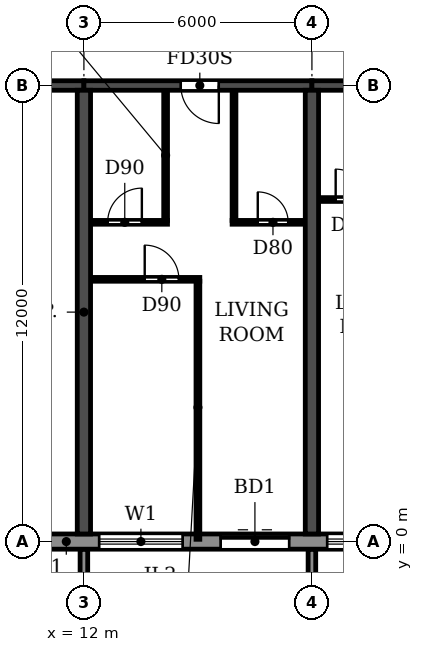
"""IFC4 building model, lengths in metres.
Left out: names, types, materials, properties, quantities, classifications, styles, units other than length and angle.
Written with IfcOpenShell. Run it as: python <this file> out.ifc"""

import sys

from ifc_helpers import new_model, si_unit, direction, frame, frame_2d, origin, place, context, subcontext, project, spatial, polyline, rectangle, outline, extrude, source, transform, mapped, element, fill, save


model = new_model("IFC4")
c1 = context("Model", 3, precision=1e-05, world=origin(), true_north=direction((0.0, 1.0)))
c2 = subcontext(c1, "Body", "Model", "MODEL_VIEW")
j1 = project(units=[si_unit("LENGTHUNIT", "METRE"), si_unit("PLANEANGLEUNIT", "RADIAN")], contexts=[c1])
p1 = place(None, origin())
s1 = spatial("IfcSite", under=j1, at=p1, CompositionType="ELEMENT")
p2 = place(p1, origin())
s2 = spatial("IfcBuilding", under=s1, at=p2, CompositionType="ELEMENT")
p3 = place(p2, frame((0.0, 0.0, 76.2)))
s3 = spatial("IfcBuildingStorey", under=s2, at=p3, CompositionType="ELEMENT", Elevation=76.2)
for number, where, z_axis, x_axis in (
    (1, (12.0, 0.2, 0.0), (0.0, 0.0, 1.0), (0.0, 1.0, 0.0)),
    (2, (18.0, 0.2, 0.0), (0.0, 0.0, 1.0), (0.0, 1.0, 0.0)),
):
    element("IfcWall", number, at=place(p3, frame(where, z_axis=z_axis, x_axis=x_axis)), inside=s3, PredefinedType="SHEAR", context=c2, shape_type="SweptSolid", body=[
        extrude(rectangle(XDim=11.675, YDim=0.35, at=frame_2d((5.837, 0.0))), origin(), (0.0, 0.0, 1.0), 3.06),
    ])
p4 = place(p3, frame((6.2, 12.0, 0.0), z_axis=(0.0, 0.0, 1.0), x_axis=(1.0, 0.0, 0.0)))
e3 = element("IfcWall", 3, at=p4, inside=s3, PredefinedType="SHEAR", context=c2, shape_type="SweptSolid", body=[
    extrude(rectangle(XDim=5.8, YDim=0.25, at=frame_2d((2.9, 0.0))), origin(), (0.0, 0.0, 1.0), 2.46),
])
p5 = place(p4, frame((2.3, 0.0, 0.0)))
e4 = element("IfcOpeningElement", 4, at=p5, cuts=e3, PredefinedType="OPENING", context=c2, shape_type="SweptSolid", body=[
    extrude(rectangle(XDim=1.0, YDim=2.1, at=frame_2d((0.5, 1.05))), frame((0.0, 0.135, 0.0), z_axis=(0.0, -1.0, 0.0), x_axis=(1.0, 0.0, 0.0)), (0.0, 0.0, 1.0), 0.27),
])
p6 = place(p3, frame((12.0, 12.0, 0.0), z_axis=(0.0, 0.0, 1.0), x_axis=(1.0, 0.0, 0.0)))
e5 = element("IfcWall", 5, at=p6, inside=s3, PredefinedType="SHEAR", context=c2, shape_type="SweptSolid", body=[
    extrude(rectangle(XDim=6.0, YDim=0.25, at=frame_2d((3.0, 0.0))), origin(), (0.0, 0.0, 1.0), 2.46),
])
p7 = place(p6, frame((2.55, 0.0, 0.0)))
e6 = element("IfcOpeningElement", 6, at=p7, cuts=e5, PredefinedType="OPENING", context=c2, shape_type="SweptSolid", body=[
    extrude(rectangle(XDim=1.0, YDim=2.1, at=frame_2d((0.5, 1.05))), frame((0.0, 0.135, 0.0), z_axis=(0.0, -1.0, 0.0), x_axis=(1.0, 0.0, 0.0)), (0.0, 0.0, 1.0), 0.27),
])
p8 = place(p3, frame((18.0, 12.0, 0.0), z_axis=(0.0, 0.0, 1.0), x_axis=(1.0, 0.0, 0.0)))
e7 = element("IfcWall", 7, at=p8, inside=s3, PredefinedType="SHEAR", context=c2, shape_type="SweptSolid", body=[
    extrude(rectangle(XDim=6.0, YDim=0.25, at=frame_2d((3.0, 0.0))), origin(), (0.0, 0.0, 1.0), 2.46),
])
p9 = place(p8, frame((2.45, 0.0, 0.0)))
e8 = element("IfcOpeningElement", 8, at=p9, cuts=e7, PredefinedType="OPENING", context=c2, shape_type="SweptSolid", body=[
    extrude(rectangle(XDim=1.0, YDim=2.1, at=frame_2d((0.5, 1.05))), frame((0.0, 0.135, 0.0), z_axis=(0.0, -1.0, 0.0), x_axis=(1.0, 0.0, 0.0)), (0.0, 0.0, 1.0), 0.27),
])
p10 = place(p3, frame((10.683, 0.0, 0.0), z_axis=(0.0, 0.0, 1.0), x_axis=(1.0, 0.0, 0.0)))
e9 = element("IfcWall", 9, at=p10, inside=s3, PredefinedType="STANDARD", context=c2, shape_type="SweptSolid", body=[
    extrude(rectangle(XDim=80.634, YDim=0.4, at=frame_2d((40.317, 0.0))), origin(), (0.0, 0.0, 1.0), 3.06),
])
p11 = place(p10, frame((1.717, 0.0, 0.9)))
e10 = element("IfcOpeningElement", 10, at=p11, cuts=e9, PredefinedType="OPENING", context=c2, shape_type="SweptSolid", body=[
    extrude(rectangle(XDim=2.2, YDim=1.5, at=frame_2d((1.1, 0.75))), frame((0.0, 0.21, 0.0), z_axis=(0.0, -1.0, 0.0), x_axis=(1.0, 0.0, 0.0)), (0.0, 0.0, 1.0), 0.42),
])
p12 = place(p10, frame((4.917, 0.0, 0.0)))
e11 = element("IfcOpeningElement", 11, at=p12, cuts=e9, PredefinedType="OPENING", context=c2, shape_type="SweptSolid", body=[
    extrude(rectangle(XDim=1.8, YDim=2.4, at=frame_2d((0.9, 1.2))), frame((0.0, 0.21, 0.0), z_axis=(0.0, -1.0, 0.0), x_axis=(1.0, 0.0, 0.0)), (0.0, 0.0, 1.0), 0.42),
])
p13 = place(p10, frame((7.717, 0.0, 0.9)))
e12 = element("IfcOpeningElement", 12, at=p13, cuts=e9, PredefinedType="OPENING", context=c2, shape_type="SweptSolid", body=[
    extrude(rectangle(XDim=2.2, YDim=1.5, at=frame_2d((1.1, 0.75))), frame((0.0, 0.21, 0.0), z_axis=(0.0, -1.0, 0.0), x_axis=(1.0, 0.0, 0.0)), (0.0, 0.0, 1.0), 0.42),
])
p14 = place(p10, frame((10.717, 0.0, 0.9)))
e13 = element("IfcOpeningElement", 13, at=p14, cuts=e9, PredefinedType="OPENING", context=c2, shape_type="SweptSolid", body=[
    extrude(rectangle(XDim=2.2, YDim=1.5, at=frame_2d((1.1, 0.75))), frame((0.0, 0.21, 0.0), z_axis=(0.0, -1.0, 0.0), x_axis=(1.0, 0.0, 0.0)), (0.0, 0.0, 1.0), 0.42),
])
p15 = place(p10, frame((13.717, 0.0, 0.9)))
e14 = element("IfcOpeningElement", 14, at=p15, cuts=e9, PredefinedType="OPENING", context=c2, shape_type="SweptSolid", body=[
    extrude(rectangle(XDim=2.2, YDim=1.5, at=frame_2d((1.1, 0.75))), frame((0.0, 0.21, 0.0), z_axis=(0.0, -1.0, 0.0), x_axis=(1.0, 0.0, 0.0)), (0.0, 0.0, 1.0), 0.42),
])
p16 = place(p10, frame((16.917, 0.0, 0.0)))
e15 = element("IfcOpeningElement", 15, at=p16, cuts=e9, PredefinedType="OPENING", context=c2, shape_type="SweptSolid", body=[
    extrude(rectangle(XDim=1.8, YDim=2.4, at=frame_2d((0.9, 1.2))), frame((0.0, 0.21, 0.0), z_axis=(0.0, -1.0, 0.0), x_axis=(1.0, 0.0, 0.0)), (0.0, 0.0, 1.0), 0.42),
])
p17 = place(p10, frame((19.717, 0.0, 0.9)))
e16 = element("IfcOpeningElement", 16, at=p17, cuts=e9, PredefinedType="OPENING", context=c2, shape_type="SweptSolid", body=[
    extrude(rectangle(XDim=2.2, YDim=1.5, at=frame_2d((1.1, 0.75))), frame((0.0, 0.21, 0.0), z_axis=(0.0, -1.0, 0.0), x_axis=(1.0, 0.0, 0.0)), (0.0, 0.0, 1.0), 0.42),
])
p18 = place(p10, frame((22.717, 0.0, 0.9)))
e17 = element("IfcOpeningElement", 17, at=p18, cuts=e9, PredefinedType="OPENING", context=c2, shape_type="SweptSolid", body=[
    extrude(rectangle(XDim=2.2, YDim=1.5, at=frame_2d((1.1, 0.75))), frame((0.0, 0.21, 0.0), z_axis=(0.0, -1.0, 0.0), x_axis=(1.0, 0.0, 0.0)), (0.0, 0.0, 1.0), 0.42),
])
p19 = place(p10, frame((25.917, 0.0, 0.0)))
e18 = element("IfcOpeningElement", 18, at=p19, cuts=e9, PredefinedType="OPENING", context=c2, shape_type="SweptSolid", body=[
    extrude(rectangle(XDim=1.8, YDim=2.4, at=frame_2d((0.9, 1.2))), frame((0.0, 0.21, 0.0), z_axis=(0.0, -1.0, 0.0), x_axis=(1.0, 0.0, 0.0)), (0.0, 0.0, 1.0), 0.42),
])
p20 = place(p10, frame((28.717, 0.0, 0.9)))
e19 = element("IfcOpeningElement", 19, at=p20, cuts=e9, PredefinedType="OPENING", context=c2, shape_type="SweptSolid", body=[
    extrude(rectangle(XDim=2.2, YDim=1.5, at=frame_2d((1.1, 0.75))), frame((0.0, 0.21, 0.0), z_axis=(0.0, -1.0, 0.0), x_axis=(1.0, 0.0, 0.0)), (0.0, 0.0, 1.0), 0.42),
])
p21 = place(p10, frame((31.717, 0.0, 0.9)))
e20 = element("IfcOpeningElement", 20, at=p21, cuts=e9, PredefinedType="OPENING", context=c2, shape_type="SweptSolid", body=[
    extrude(rectangle(XDim=2.2, YDim=1.5, at=frame_2d((1.1, 0.75))), frame((0.0, 0.21, 0.0), z_axis=(0.0, -1.0, 0.0), x_axis=(1.0, 0.0, 0.0)), (0.0, 0.0, 1.0), 0.42),
])
p22 = place(p10, frame((34.717, 0.0, 0.9)))
e21 = element("IfcOpeningElement", 21, at=p22, cuts=e9, PredefinedType="OPENING", context=c2, shape_type="SweptSolid", body=[
    extrude(rectangle(XDim=2.2, YDim=1.5, at=frame_2d((1.1, 0.75))), frame((0.0, 0.21, 0.0), z_axis=(0.0, -1.0, 0.0), x_axis=(1.0, 0.0, 0.0)), (0.0, 0.0, 1.0), 0.42),
])
p23 = place(p10, frame((37.917, 0.0, 0.0)))
e22 = element("IfcOpeningElement", 22, at=p23, cuts=e9, PredefinedType="OPENING", context=c2, shape_type="SweptSolid", body=[
    extrude(rectangle(XDim=1.8, YDim=2.4, at=frame_2d((0.9, 1.2))), frame((0.0, 0.21, 0.0), z_axis=(0.0, -1.0, 0.0), x_axis=(1.0, 0.0, 0.0)), (0.0, 0.0, 1.0), 0.42),
])
p24 = place(p10, frame((40.717, 0.0, 0.9)))
e23 = element("IfcOpeningElement", 23, at=p24, cuts=e9, PredefinedType="OPENING", context=c2, shape_type="SweptSolid", body=[
    extrude(rectangle(XDim=2.2, YDim=1.5, at=frame_2d((1.1, 0.75))), frame((0.0, 0.21, 0.0), z_axis=(0.0, -1.0, 0.0), x_axis=(1.0, 0.0, 0.0)), (0.0, 0.0, 1.0), 0.42),
])
p25 = place(p10, frame((43.717, 0.0, 0.9)))
e24 = element("IfcOpeningElement", 24, at=p25, cuts=e9, PredefinedType="OPENING", context=c2, shape_type="SweptSolid", body=[
    extrude(rectangle(XDim=2.2, YDim=1.5, at=frame_2d((1.1, 0.75))), frame((0.0, 0.21, 0.0), z_axis=(0.0, -1.0, 0.0), x_axis=(1.0, 0.0, 0.0)), (0.0, 0.0, 1.0), 0.42),
])
p26 = place(p10, frame((46.717, 0.0, 0.9)))
e25 = element("IfcOpeningElement", 25, at=p26, cuts=e9, PredefinedType="OPENING", context=c2, shape_type="SweptSolid", body=[
    extrude(rectangle(XDim=2.2, YDim=1.5, at=frame_2d((1.1, 0.75))), frame((0.0, 0.21, 0.0), z_axis=(0.0, -1.0, 0.0), x_axis=(1.0, 0.0, 0.0)), (0.0, 0.0, 1.0), 0.42),
])
p27 = place(p10, frame((49.917, 0.0, 0.0)))
e26 = element("IfcOpeningElement", 26, at=p27, cuts=e9, PredefinedType="OPENING", context=c2, shape_type="SweptSolid", body=[
    extrude(rectangle(XDim=1.8, YDim=2.4, at=frame_2d((0.9, 1.2))), frame((0.0, 0.21, 0.0), z_axis=(0.0, -1.0, 0.0), x_axis=(1.0, 0.0, 0.0)), (0.0, 0.0, 1.0), 0.42),
])
p28 = place(p10, frame((52.717, 0.0, 0.9)))
e27 = element("IfcOpeningElement", 27, at=p28, cuts=e9, PredefinedType="OPENING", context=c2, shape_type="SweptSolid", body=[
    extrude(rectangle(XDim=2.2, YDim=1.5, at=frame_2d((1.1, 0.75))), frame((0.0, 0.21, 0.0), z_axis=(0.0, -1.0, 0.0), x_axis=(1.0, 0.0, 0.0)), (0.0, 0.0, 1.0), 0.42),
])
p29 = place(p10, frame((55.717, 0.0, 0.9)))
e28 = element("IfcOpeningElement", 28, at=p29, cuts=e9, PredefinedType="OPENING", context=c2, shape_type="SweptSolid", body=[
    extrude(rectangle(XDim=2.2, YDim=1.5, at=frame_2d((1.1, 0.75))), frame((0.0, 0.21, 0.0), z_axis=(0.0, -1.0, 0.0), x_axis=(1.0, 0.0, 0.0)), (0.0, 0.0, 1.0), 0.42),
])
p30 = place(p10, frame((58.717, 0.0, 0.9)))
e29 = element("IfcOpeningElement", 29, at=p30, cuts=e9, PredefinedType="OPENING", context=c2, shape_type="SweptSolid", body=[
    extrude(rectangle(XDim=2.2, YDim=1.5, at=frame_2d((1.1, 0.75))), frame((0.0, 0.21, 0.0), z_axis=(0.0, -1.0, 0.0), x_axis=(1.0, 0.0, 0.0)), (0.0, 0.0, 1.0), 0.42),
])
p31 = place(p10, frame((61.717, 0.0, 0.9)))
e30 = element("IfcOpeningElement", 30, at=p31, cuts=e9, PredefinedType="OPENING", context=c2, shape_type="SweptSolid", body=[
    extrude(rectangle(XDim=2.2, YDim=1.5, at=frame_2d((1.1, 0.75))), frame((0.0, 0.21, 0.0), z_axis=(0.0, -1.0, 0.0), x_axis=(1.0, 0.0, 0.0)), (0.0, 0.0, 1.0), 0.42),
])
p32 = place(p10, frame((64.917, 0.0, 0.0)))
e31 = element("IfcOpeningElement", 31, at=p32, cuts=e9, PredefinedType="OPENING", context=c2, shape_type="SweptSolid", body=[
    extrude(rectangle(XDim=1.8, YDim=2.4, at=frame_2d((0.9, 1.2))), frame((0.0, 0.21, 0.0), z_axis=(0.0, -1.0, 0.0), x_axis=(1.0, 0.0, 0.0)), (0.0, 0.0, 1.0), 0.42),
])
p33 = place(p10, frame((67.717, 0.0, 0.9)))
e32 = element("IfcOpeningElement", 32, at=p33, cuts=e9, PredefinedType="OPENING", context=c2, shape_type="SweptSolid", body=[
    extrude(rectangle(XDim=2.2, YDim=1.5, at=frame_2d((1.1, 0.75))), frame((0.0, 0.21, 0.0), z_axis=(0.0, -1.0, 0.0), x_axis=(1.0, 0.0, 0.0)), (0.0, 0.0, 1.0), 0.42),
])
p34 = place(p10, frame((70.717, 0.0, 0.9)))
e33 = element("IfcOpeningElement", 33, at=p34, cuts=e9, PredefinedType="OPENING", context=c2, shape_type="SweptSolid", body=[
    extrude(rectangle(XDim=2.2, YDim=1.5, at=frame_2d((1.1, 0.75))), frame((0.0, 0.21, 0.0), z_axis=(0.0, -1.0, 0.0), x_axis=(1.0, 0.0, 0.0)), (0.0, 0.0, 1.0), 0.42),
])
p35 = place(p10, frame((73.917, 0.0, 0.0)))
e34 = element("IfcOpeningElement", 34, at=p35, cuts=e9, PredefinedType="OPENING", context=c2, shape_type="SweptSolid", body=[
    extrude(rectangle(XDim=1.8, YDim=2.4, at=frame_2d((0.9, 1.2))), frame((0.0, 0.21, 0.0), z_axis=(0.0, -1.0, 0.0), x_axis=(1.0, 0.0, 0.0)), (0.0, 0.0, 1.0), 0.42),
])
p36 = place(p10, frame((76.717, 0.0, 0.9)))
e35 = element("IfcOpeningElement", 35, at=p36, cuts=e9, PredefinedType="OPENING", context=c2, shape_type="SweptSolid", body=[
    extrude(rectangle(XDim=2.2, YDim=1.5, at=frame_2d((1.1, 0.75))), frame((0.0, 0.21, 0.0), z_axis=(0.0, -1.0, 0.0), x_axis=(1.0, 0.0, 0.0)), (0.0, 0.0, 1.0), 0.42),
])
m1 = source(origin(), c2, "Body", "SweptSolid", [
    extrude(outline(polyline([(0.0, 0.0), (0.2, 0.0), (0.2, 1.65), (0.0, 1.65), (0.0, 0.0)])), origin(), (0.0, 0.0, 1.0), 3.1),
])
for number, where in (
    (36, (11.9, -1.85, 0.0)),
    (37, (17.9, -1.85, 0.0)),
):
    element("IfcWall", number, at=place(p3, frame(where)), inside=s3, PredefinedType="STANDARD", context=c2, shape_type="MappedRepresentation", body=[
        mapped(m1, transform((0.0, 0.0, 0.0))),
    ])
p37 = place(p3, frame((12.185, 6.9, 0.0), z_axis=(0.0, 0.0, 1.0), x_axis=(1.0, 0.0, 0.0)))
e38 = element("IfcWall", 38, at=p37, inside=s3, PredefinedType="PARTITIONING", context=c2, shape_type="SweptSolid", body=[
    extrude(rectangle(XDim=2.865, YDim=0.1, at=frame_2d((1.433, 0.0))), origin(), (0.0, 0.0, 1.0), 3.06),
])
p38 = place(p37, frame((1.415, 0.0, 0.0)))
e39 = element("IfcOpeningElement", 39, at=p38, cuts=e38, PredefinedType="OPENING", context=c2, shape_type="SweptSolid", body=[
    extrude(rectangle(XDim=0.9, YDim=2.1, at=frame_2d((0.45, 1.05))), frame((0.0, 0.06, 0.0), z_axis=(0.0, -1.0, 0.0), x_axis=(1.0, 0.0, 0.0)), (0.0, 0.0, 1.0), 0.12),
])
p39 = place(p3, frame((12.185, 8.4, 0.0), z_axis=(0.0, 0.0, 1.0), x_axis=(1.0, 0.0, 0.0)))
e40 = element("IfcWall", 40, at=p39, inside=s3, PredefinedType="PARTITIONING", context=c2, shape_type="SweptSolid", body=[
    extrude(rectangle(XDim=2.015, YDim=0.1, at=frame_2d((1.007, 0.0))), origin(), (0.0, 0.0, 1.0), 3.06),
])
p40 = place(p39, frame((0.44, 0.0, 0.0)))
e41 = element("IfcOpeningElement", 41, at=p40, cuts=e40, PredefinedType="OPENING", context=c2, shape_type="SweptSolid", body=[
    extrude(rectangle(XDim=0.9, YDim=2.1, at=frame_2d((0.45, 1.05))), frame((0.0, 0.06, 0.0), z_axis=(0.0, -1.0, 0.0), x_axis=(1.0, 0.0, 0.0)), (0.0, 0.0, 1.0), 0.12),
])
p41 = place(p3, frame((15.9, 8.4, 0.0), z_axis=(0.0, 0.0, 1.0), x_axis=(1.0, 0.0, 0.0)))
e42 = element("IfcWall", 42, at=p41, inside=s3, PredefinedType="PARTITIONING", context=c2, shape_type="SweptSolid", body=[
    extrude(rectangle(XDim=1.915, YDim=0.1, at=frame_2d((0.958, 0.0))), origin(), (0.0, 0.0, 1.0), 3.06),
])
p42 = place(p41, frame((0.675, 0.0, 0.0)))
e43 = element("IfcOpeningElement", 43, at=p42, cuts=e42, PredefinedType="OPENING", context=c2, shape_type="SweptSolid", body=[
    extrude(rectangle(XDim=0.8, YDim=2.1, at=frame_2d((0.4, 1.05))), frame((0.0, 0.06, 0.0), z_axis=(0.0, -1.0, 0.0), x_axis=(1.0, 0.0, 0.0)), (0.0, 0.0, 1.0), 0.12),
])
p43 = place(p3, frame((18.185, 9.0, 0.0), z_axis=(0.0, 0.0, 1.0), x_axis=(1.0, 0.0, 0.0)))
e44 = element("IfcWall", 44, at=p43, inside=s3, PredefinedType="PARTITIONING", context=c2, shape_type="SweptSolid", body=[
    extrude(rectangle(XDim=1.915, YDim=0.1, at=frame_2d((0.958, 0.0))), origin(), (0.0, 0.0, 1.0), 3.06),
])
p44 = place(p43, frame((0.44, 0.0, 0.0)))
e45 = element("IfcOpeningElement", 45, at=p44, cuts=e44, PredefinedType="OPENING", context=c2, shape_type="SweptSolid", body=[
    extrude(rectangle(XDim=0.8, YDim=2.1, at=frame_2d((0.4, 1.05))), frame((0.0, 0.06, 0.0), z_axis=(0.0, -1.0, 0.0), x_axis=(1.0, 0.0, 0.0)), (0.0, 0.0, 1.0), 0.12),
])
p45 = place(p3, frame((14.15, 8.45, 0.0), z_axis=(0.0, 0.0, 1.0), x_axis=(0.0, 1.0, 0.0)))
e46 = element("IfcWall", 46, at=p45, inside=s3, PredefinedType="PARTITIONING", context=c2, shape_type="SweptSolid", body=[
    extrude(rectangle(XDim=3.415, YDim=0.1, at=frame_2d((1.708, 0.0))), origin(), (0.0, 0.0, 1.0), 3.06),
])
p46 = place(p3, frame((15.0, 0.06, 0.0), z_axis=(0.0, 0.0, 1.0), x_axis=(0.0, 1.0, 0.0)))
e47 = element("IfcWall", 47, at=p46, inside=s3, PredefinedType="PARTITIONING", context=c2, shape_type="SweptSolid", body=[
    extrude(rectangle(XDim=6.79, YDim=0.1, at=frame_2d((3.395, 0.0))), origin(), (0.0, 0.0, 1.0), 3.06),
])
p47 = place(p3, frame((15.95, 8.45, 0.0), z_axis=(0.0, 0.0, 1.0), x_axis=(0.0, 1.0, 0.0)))
e48 = element("IfcWall", 48, at=p47, inside=s3, PredefinedType="PARTITIONING", context=c2, shape_type="SweptSolid", body=[
    extrude(rectangle(XDim=3.415, YDim=0.1, at=frame_2d((1.708, 0.0))), origin(), (0.0, 0.0, 1.0), 3.06),
])
p48 = place(p11, origin())
e49 = element("IfcWindow", 49, at=p48, inside=s3, PartitioningType="DOUBLE_PANEL_HORIZONTAL", PredefinedType="WINDOW", context=c2, shape_type="SweptSolid", body=[
    extrude(rectangle(XDim=2.2, YDim=1.5, at=frame_2d((1.1, 0.75))), frame((0.0, 0.03, 0.0), z_axis=(0.0, -1.0, 0.0), x_axis=(1.0, 0.0, 0.0)), (0.0, 0.0, 1.0), 0.06),
])
fill(e10, e49)
p49 = place(p12, origin())
e50 = element("IfcDoor", 50, at=p49, inside=s3, OperationType="DOUBLE_DOOR_SLIDING", PredefinedType="DOOR", context=c2, shape_type="SweptSolid", body=[
    extrude(rectangle(XDim=1.8, YDim=2.4, at=frame_2d((0.9, 1.2))), frame((0.0, 0.025, 0.0), z_axis=(0.0, -1.0, 0.0), x_axis=(1.0, 0.0, 0.0)), (0.0, 0.0, 1.0), 0.05),
])
fill(e11, e50)
p50 = place(p13, origin())
e51 = element("IfcWindow", 51, at=p50, inside=s3, PartitioningType="DOUBLE_PANEL_HORIZONTAL", PredefinedType="WINDOW", context=c2, shape_type="SweptSolid", body=[
    extrude(rectangle(XDim=2.2, YDim=1.5, at=frame_2d((1.1, 0.75))), frame((0.0, 0.03, 0.0), z_axis=(0.0, -1.0, 0.0), x_axis=(1.0, 0.0, 0.0)), (0.0, 0.0, 1.0), 0.06),
])
fill(e12, e51)
p51 = place(p40, origin())
e52 = element("IfcDoor", 52, at=p51, inside=s3, OperationType="SINGLE_SWING_RIGHT", PredefinedType="DOOR", context=c2, shape_type="SweptSolid", body=[
    extrude(rectangle(XDim=0.9, YDim=2.1, at=frame_2d((0.45, 1.05))), frame((0.0, 0.025, 0.0), z_axis=(0.0, -1.0, 0.0), x_axis=(1.0, 0.0, 0.0)), (0.0, 0.0, 1.0), 0.05),
])
fill(e41, e52)
p52 = place(p38, origin())
e53 = element("IfcDoor", 53, at=p52, inside=s3, OperationType="SINGLE_SWING_LEFT", PredefinedType="DOOR", context=c2, shape_type="SweptSolid", body=[
    extrude(rectangle(XDim=0.9, YDim=2.1, at=frame_2d((0.45, 1.05))), frame((0.0, 0.025, 0.0), z_axis=(0.0, -1.0, 0.0), x_axis=(1.0, 0.0, 0.0)), (0.0, 0.0, 1.0), 0.05),
])
fill(e39, e53)
p53 = place(p7, frame((1.0, 0.0, 0.0), z_axis=(0.0, 0.0, 1.0), x_axis=(-1.0, 0.0, 0.0)))
e54 = element("IfcDoor", 54, at=p53, inside=s3, OperationType="SINGLE_SWING_LEFT", PredefinedType="DOOR", context=c2, shape_type="SweptSolid", body=[
    extrude(rectangle(XDim=1.0, YDim=2.1, at=frame_2d((0.5, 1.05))), frame((0.0, 0.025, 0.0), z_axis=(0.0, -1.0, 0.0), x_axis=(1.0, 0.0, 0.0)), (0.0, 0.0, 1.0), 0.05),
])
fill(e6, e54)
p54 = place(p42, origin())
e55 = element("IfcDoor", 55, at=p54, inside=s3, OperationType="SINGLE_SWING_LEFT", PredefinedType="DOOR", context=c2, shape_type="SweptSolid", body=[
    extrude(rectangle(XDim=0.8, YDim=2.1, at=frame_2d((0.4, 1.05))), frame((0.0, 0.025, 0.0), z_axis=(0.0, -1.0, 0.0), x_axis=(1.0, 0.0, 0.0)), (0.0, 0.0, 1.0), 0.05),
])
fill(e43, e55)
p55 = place(p44, origin())
e56 = element("IfcDoor", 56, at=p55, inside=s3, OperationType="SINGLE_SWING_LEFT", PredefinedType="DOOR", context=c2, shape_type="SweptSolid", body=[
    extrude(rectangle(XDim=0.8, YDim=2.1, at=frame_2d((0.4, 1.05))), frame((0.0, 0.025, 0.0), z_axis=(0.0, -1.0, 0.0), x_axis=(1.0, 0.0, 0.0)), (0.0, 0.0, 1.0), 0.05),
])
fill(e45, e56)
save(model, sys.argv[1])
